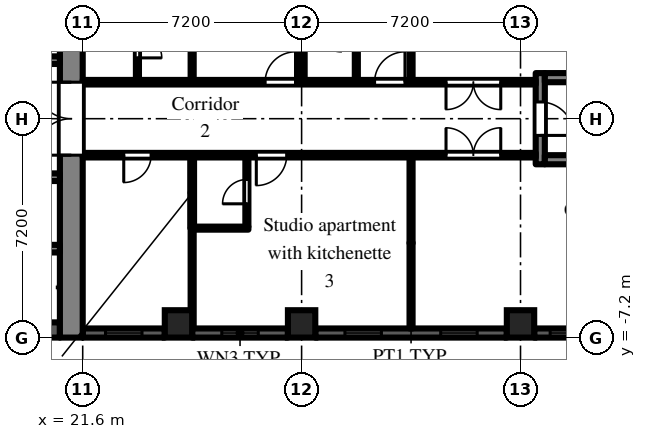
"""IFC4 building model, lengths in metres.
Left out: names, types, materials, properties, quantities, classifications, styles, units other than length and angle.
Written with IfcOpenShell. Run it as: python <this file> out.ifc"""

import sys

from ifc_helpers import new_model, si_unit, direction, frame, frame_2d, origin, origin_2d, place, context, subcontext, project, spatial, rectangle, extrude, element, fill, save


model = new_model("IFC4")
c1 = context("Model", 3, precision=1e-05, world=origin(), true_north=direction((0.0, 1.0)))
c2 = subcontext(c1, "Body", "Model", "MODEL_VIEW")
j1 = project(units=[si_unit("LENGTHUNIT", "METRE"), si_unit("PLANEANGLEUNIT", "RADIAN")], contexts=[c1])
p1 = place(None, origin())
s1 = spatial("IfcSite", under=j1, at=p1, CompositionType="ELEMENT")
p2 = place(p1, origin())
s2 = spatial("IfcBuilding", under=s1, at=p2, CompositionType="ELEMENT")
p3 = place(p2, frame((0.0, 0.0, 29.7)))
s3 = spatial("IfcBuildingStorey", under=s2, at=p3, CompositionType="ELEMENT", Elevation=29.7)
for number, where, z_axis, x_axis in (
    (1, (24.75, -6.75, 0.0), (0.0, 0.0, 1.0), (1.0, 0.0, 0.0)),
    (2, (28.8, -6.75, 0.0), (0.0, 0.0, 1.0), (1.0, 0.0, 0.0)),
    (3, (36.0, -6.75, 0.0), (0.0, 0.0, 1.0), (1.0, 0.0, 0.0)),
):
    element("IfcColumn", number, at=place(p3, frame(where, z_axis=z_axis, x_axis=x_axis)), inside=s3, PredefinedType="COLUMN", context=c2, shape_type="SweptSolid", body=[
        extrude(rectangle(XDim=0.9, YDim=0.9, at=origin_2d()), origin(), (0.0, 0.0, 1.0), 3.0),
    ])
p4 = place(p3, frame((21.6, -7.05, 0.0), z_axis=(0.0, 0.0, 1.0), x_axis=(1.0, 0.0, 0.0)))
e4 = element("IfcWall", 4, at=p4, inside=s3, PredefinedType="SOLIDWALL", context=c2, shape_type="SweptSolid", body=[
    extrude(rectangle(XDim=2.7, YDim=0.3, at=frame_2d((1.35, 0.0))), origin(), (0.0, 0.0, 1.0), 2.1),
])
p5 = place(p4, frame((0.75, 0.0, 0.2)))
e5 = element("IfcOpeningElement", 5, at=p5, cuts=e4, PredefinedType="OPENING", context=c2, shape_type="SweptSolid", body=[
    extrude(rectangle(XDim=1.2, YDim=1.85, at=frame_2d((0.6, 0.925))), frame((0.0, 0.16, 0.0), z_axis=(0.0, -1.0, 0.0), x_axis=(1.0, 0.0, 0.0)), (0.0, 0.0, 1.0), 0.32),
])
p6 = place(p3, frame((25.2, -7.05, 0.0), z_axis=(0.0, 0.0, 1.0), x_axis=(1.0, 0.0, 0.0)))
e6 = element("IfcWall", 6, at=p6, inside=s3, PredefinedType="SOLIDWALL", context=c2, shape_type="SweptSolid", body=[
    extrude(rectangle(XDim=3.15, YDim=0.3, at=frame_2d((1.575, 0.0))), origin(), (0.0, 0.0, 1.0), 2.1),
])
p7 = place(p6, frame((0.975, 0.0, 0.2)))
e7 = element("IfcOpeningElement", 7, at=p7, cuts=e6, PredefinedType="OPENING", context=c2, shape_type="SweptSolid", body=[
    extrude(rectangle(XDim=1.2, YDim=1.85, at=frame_2d((0.6, 0.925))), frame((0.0, 0.16, 0.0), z_axis=(0.0, -1.0, 0.0), x_axis=(1.0, 0.0, 0.0)), (0.0, 0.0, 1.0), 0.32),
])
p8 = place(p3, frame((29.25, -7.05, 0.0), z_axis=(0.0, 0.0, 1.0), x_axis=(1.0, 0.0, 0.0)))
e8 = element("IfcWall", 8, at=p8, inside=s3, PredefinedType="SOLIDWALL", context=c2, shape_type="SweptSolid", body=[
    extrude(rectangle(XDim=6.3, YDim=0.3, at=frame_2d((3.15, 0.0))), origin(), (0.0, 0.0, 1.0), 2.1),
])
p9 = place(p8, frame((0.975, 0.0, 0.2)))
e9 = element("IfcOpeningElement", 9, at=p9, cuts=e8, PredefinedType="OPENING", context=c2, shape_type="SweptSolid", body=[
    extrude(rectangle(XDim=1.2, YDim=1.85, at=frame_2d((0.6, 0.925))), frame((0.0, 0.16, 0.0), z_axis=(0.0, -1.0, 0.0), x_axis=(1.0, 0.0, 0.0)), (0.0, 0.0, 1.0), 0.32),
])
p10 = place(p8, frame((4.125, 0.0, 0.2)))
e10 = element("IfcOpeningElement", 10, at=p10, cuts=e8, PredefinedType="OPENING", context=c2, shape_type="SweptSolid", body=[
    extrude(rectangle(XDim=1.2, YDim=1.85, at=frame_2d((0.6, 0.925))), frame((0.0, 0.16, 0.0), z_axis=(0.0, -1.0, 0.0), x_axis=(1.0, 0.0, 0.0)), (0.0, 0.0, 1.0), 0.32),
])
p11 = place(p3, frame((36.45, -7.05, 0.0), z_axis=(0.0, 0.0, 1.0), x_axis=(1.0, 0.0, 0.0)))
e11 = element("IfcWall", 11, at=p11, inside=s3, PredefinedType="SOLIDWALL", context=c2, shape_type="SweptSolid", body=[
    extrude(rectangle(XDim=2.25, YDim=0.3, at=frame_2d((1.125, 0.0))), origin(), (0.0, 0.0, 1.0), 2.1),
])
p12 = place(p11, frame((0.525, 0.0, 0.2)))
e12 = element("IfcOpeningElement", 12, at=p12, cuts=e11, PredefinedType="OPENING", context=c2, shape_type="SweptSolid", body=[
    extrude(rectangle(XDim=1.2, YDim=1.85, at=frame_2d((0.6, 0.925))), frame((0.0, 0.16, 0.0), z_axis=(0.0, -1.0, 0.0), x_axis=(1.0, 0.0, 0.0)), (0.0, 0.0, 1.0), 0.32),
])
p13 = place(p3, frame((21.225, -7.2, 0.0), z_axis=(0.0, 0.0, 1.0), x_axis=(0.0, 1.0, 0.0)))
e13 = element("IfcWall", 13, at=p13, inside=s3, PredefinedType="SHEAR", context=c2, shape_type="SweptSolid", body=[
    extrude(rectangle(XDim=14.4, YDim=0.75, at=frame_2d((7.2, 0.0))), origin(), (0.0, 0.0, 1.0), 2.575),
])
p14 = place(p13, frame((6.0, 0.0, 0.0)))
e14 = element("IfcOpeningElement", 14, at=p14, cuts=e13, PredefinedType="OPENING", context=c2, shape_type="SweptSolid", body=[
    extrude(rectangle(XDim=2.4, YDim=2.2, at=frame_2d((1.2, 1.1))), frame((0.0, 0.385, 0.0), z_axis=(0.0, -1.0, 0.0), x_axis=(1.0, 0.0, 0.0)), (0.0, 0.0, 1.0), 0.77),
])
p15 = place(p3, frame((7.9, 1.925, 0.0), z_axis=(0.0, 0.0, 1.0), x_axis=(1.0, 0.0, 0.0)))
e15 = element("IfcWall", 15, at=p15, inside=s3, PredefinedType="SHEAR", context=c2, shape_type="SweptSolid", body=[
    extrude(rectangle(XDim=12.95, YDim=0.25, at=frame_2d((6.475, 0.0))), origin(), (0.0, 0.0, 1.0), 2.575),
])
p16 = place(p15, frame((0.525, 0.0, 0.0)))
e16 = element("IfcOpeningElement", 16, at=p16, cuts=e15, PredefinedType="OPENING", context=c2, shape_type="SweptSolid", body=[
    extrude(rectangle(XDim=0.9, YDim=2.1, at=frame_2d((0.45, 1.05))), frame((0.0, 0.135, 0.0), z_axis=(0.0, -1.0, 0.0), x_axis=(1.0, 0.0, 0.0)), (0.0, 0.0, 1.0), 0.27),
])
p17 = place(p15, frame((2.625, 0.0, 0.0)))
e17 = element("IfcOpeningElement", 17, at=p17, cuts=e15, PredefinedType="OPENING", context=c2, shape_type="SweptSolid", body=[
    extrude(rectangle(XDim=1.1, YDim=2.1, at=frame_2d((0.55, 1.05))), frame((0.0, 0.135, 0.0), z_axis=(0.0, -1.0, 0.0), x_axis=(1.0, 0.0, 0.0)), (0.0, 0.0, 1.0), 0.27),
])
p18 = place(p15, frame((6.025, 0.0, 0.0)))
e18 = element("IfcOpeningElement", 18, at=p18, cuts=e15, PredefinedType="OPENING", context=c2, shape_type="SweptSolid", body=[
    extrude(rectangle(XDim=0.9, YDim=2.1, at=frame_2d((0.45, 1.05))), frame((0.0, 0.135, 0.0), z_axis=(0.0, -1.0, 0.0), x_axis=(1.0, 0.0, 0.0)), (0.0, 0.0, 1.0), 0.27),
])
p19 = place(p15, frame((9.325, 0.0, 0.0)))
e19 = element("IfcOpeningElement", 19, at=p19, cuts=e15, PredefinedType="OPENING", context=c2, shape_type="SweptSolid", body=[
    extrude(rectangle(XDim=0.9, YDim=2.1, at=frame_2d((0.45, 1.05))), frame((0.0, 0.135, 0.0), z_axis=(0.0, -1.0, 0.0), x_axis=(1.0, 0.0, 0.0)), (0.0, 0.0, 1.0), 0.27),
])
p20 = place(p3, frame((7.9, -6.95, 0.0), z_axis=(0.0, 0.0, 1.0), x_axis=(1.0, 0.0, 0.0)))
e20 = element("IfcWall", 20, at=p20, inside=s3, PredefinedType="SHEAR", context=c2, shape_type="SweptSolid", body=[
    extrude(rectangle(XDim=12.95, YDim=0.5, at=frame_2d((6.475, 0.0))), origin(), (0.0, 0.0, 1.0), 2.575),
])
p21 = place(p3, frame((7.9, -1.925, 0.0), z_axis=(0.0, 0.0, 1.0), x_axis=(1.0, 0.0, 0.0)))
e21 = element("IfcWall", 21, at=p21, inside=s3, PredefinedType="SHEAR", context=c2, shape_type="SweptSolid", body=[
    extrude(rectangle(XDim=12.95, YDim=0.25, at=frame_2d((6.475, 0.0))), origin(), (0.0, 0.0, 1.0), 2.575),
])
p22 = place(p21, frame((4.825, 0.0, 0.0)))
e22 = element("IfcOpeningElement", 22, at=p22, cuts=e21, PredefinedType="OPENING", context=c2, shape_type="SweptSolid", body=[
    extrude(rectangle(XDim=1.1, YDim=2.1, at=frame_2d((0.55, 1.05))), frame((0.0, 0.135, 0.0), z_axis=(0.0, -1.0, 0.0), x_axis=(1.0, 0.0, 0.0)), (0.0, 0.0, 1.0), 0.27),
])
p23 = place(p21, frame((7.025, 0.0, 0.0)))
e23 = element("IfcOpeningElement", 23, at=p23, cuts=e21, PredefinedType="OPENING", context=c2, shape_type="SweptSolid", body=[
    extrude(rectangle(XDim=1.1, YDim=2.1, at=frame_2d((0.55, 1.05))), frame((0.0, 0.135, 0.0), z_axis=(0.0, -1.0, 0.0), x_axis=(1.0, 0.0, 0.0)), (0.0, 0.0, 1.0), 0.27),
])
p24 = place(p21, frame((9.225, 0.0, 0.0)))
e24 = element("IfcOpeningElement", 24, at=p24, cuts=e21, PredefinedType="OPENING", context=c2, shape_type="SweptSolid", body=[
    extrude(rectangle(XDim=1.1, YDim=2.1, at=frame_2d((0.55, 1.05))), frame((0.0, 0.135, 0.0), z_axis=(0.0, -1.0, 0.0), x_axis=(1.0, 0.0, 0.0)), (0.0, 0.0, 1.0), 0.27),
])
p25 = place(p21, frame((0.525, 0.0, 0.0)))
e25 = element("IfcOpeningElement", 25, at=p25, cuts=e21, PredefinedType="OPENING", context=c2, shape_type="SweptSolid", body=[
    extrude(rectangle(XDim=0.9, YDim=2.1, at=frame_2d((0.45, 1.05))), frame((0.0, 0.135, 0.0), z_axis=(0.0, -1.0, 0.0), x_axis=(1.0, 0.0, 0.0)), (0.0, 0.0, 1.0), 0.27),
])
p26 = place(p21, frame((2.625, 0.0, 0.0)))
e26 = element("IfcOpeningElement", 26, at=p26, cuts=e21, PredefinedType="OPENING", context=c2, shape_type="SweptSolid", body=[
    extrude(rectangle(XDim=1.1, YDim=2.1, at=frame_2d((0.55, 1.05))), frame((0.0, 0.135, 0.0), z_axis=(0.0, -1.0, 0.0), x_axis=(1.0, 0.0, 0.0)), (0.0, 0.0, 1.0), 0.27),
])
p27 = place(p3, frame((12.3, -4.275, 0.0), z_axis=(0.0, 0.0, 1.0), x_axis=(1.0, 0.0, 0.0)))
e27 = element("IfcWall", 27, at=p27, inside=s3, PredefinedType="SHEAR", context=c2, shape_type="SweptSolid", body=[
    extrude(rectangle(XDim=8.55, YDim=0.25, at=frame_2d((4.275, 0.0))), origin(), (0.0, 0.0, 1.0), 2.575),
])
p28 = place(p3, frame((36.65, -1.5, 0.0), z_axis=(0.0, 0.0, 1.0), x_axis=(0.0, 1.0, 0.0)))
e28 = element("IfcWall", 28, at=p28, inside=s3, PredefinedType="SHEAR", context=c2, shape_type="SweptSolid", body=[
    extrude(rectangle(XDim=3.0, YDim=0.3, at=frame_2d((1.5, 0.0))), origin(), (0.0, 0.0, 1.0), 2.575),
])
p29 = place(p28, frame((0.95, 0.0, 0.0)))
e29 = element("IfcOpeningElement", 29, at=p29, cuts=e28, PredefinedType="OPENING", context=c2, shape_type="SweptSolid", body=[
    extrude(rectangle(XDim=1.1, YDim=2.1, at=frame_2d((0.55, 1.05))), frame((0.0, 0.16, 0.0), z_axis=(0.0, -1.0, 0.0), x_axis=(1.0, 0.0, 0.0)), (0.0, 0.0, 1.0), 0.32),
])
for number, where, z_axis, x_axis in (
    (30, (36.8, -1.35, 0.0), (0.0, 0.0, 1.0), (1.0, 0.0, 0.0)),
    (31, (36.8, 1.35, 0.0), (0.0, 0.0, 1.0), (1.0, 0.0, 0.0)),
):
    element("IfcWall", number, at=place(p3, frame(where, z_axis=z_axis, x_axis=x_axis)), inside=s3, PredefinedType="SHEAR", context=c2, shape_type="SweptSolid", body=[
        extrude(rectangle(XDim=5.8, YDim=0.3, at=frame_2d((2.9, 0.0))), origin(), (0.0, 0.0, 1.0), 2.575),
    ])
p30 = place(p3, frame((21.6, -1.2, 0.0), z_axis=(0.0, 0.0, 1.0), x_axis=(1.0, 0.0, 0.0)))
e32 = element("IfcWall", 32, at=p30, inside=s3, PredefinedType="PARTITIONING", context=c2, shape_type="SweptSolid", body=[
    extrude(rectangle(XDim=14.9, YDim=0.15, at=frame_2d((7.45, 0.0))), origin(), (0.0, 0.0, 1.0), 2.575),
])
p31 = place(p30, frame((1.35, 0.0, 0.0)))
e33 = element("IfcOpeningElement", 33, at=p31, cuts=e32, PredefinedType="OPENING", context=c2, shape_type="SweptSolid", body=[
    extrude(rectangle(XDim=0.9, YDim=2.1, at=frame_2d((0.45, 1.05))), frame((0.0, 0.085, 0.0), z_axis=(0.0, -1.0, 0.0), x_axis=(1.0, 0.0, 0.0)), (0.0, 0.0, 1.0), 0.17),
])
p32 = place(p30, frame((5.71, 0.0, 0.0)))
e34 = element("IfcOpeningElement", 34, at=p32, cuts=e32, PredefinedType="OPENING", context=c2, shape_type="SweptSolid", body=[
    extrude(rectangle(XDim=1.0, YDim=2.1, at=frame_2d((0.5, 1.05))), frame((0.0, 0.085, 0.0), z_axis=(0.0, -1.0, 0.0), x_axis=(1.0, 0.0, 0.0)), (0.0, 0.0, 1.0), 0.17),
])
p33 = place(p30, frame((11.95, 0.0, 0.0)))
e35 = element("IfcOpeningElement", 35, at=p33, cuts=e32, PredefinedType="OPENING", context=c2, shape_type="SweptSolid", body=[
    extrude(rectangle(XDim=1.8, YDim=2.1, at=frame_2d((0.9, 1.05))), frame((0.0, 0.085, 0.0), z_axis=(0.0, -1.0, 0.0), x_axis=(1.0, 0.0, 0.0)), (0.0, 0.0, 1.0), 0.17),
])
p34 = place(p3, frame((21.6, 1.2, 0.0), z_axis=(0.0, 0.0, 1.0), x_axis=(1.0, 0.0, 0.0)))
e36 = element("IfcWall", 36, at=p34, inside=s3, PredefinedType="PARTITIONING", context=c2, shape_type="SweptSolid", body=[
    extrude(rectangle(XDim=14.9, YDim=0.15, at=frame_2d((7.45, 0.0))), origin(), (0.0, 0.0, 1.0), 2.575),
])
p35 = place(p34, frame((6.0, 0.0, 0.0)))
e37 = element("IfcOpeningElement", 37, at=p35, cuts=e36, PredefinedType="OPENING", context=c2, shape_type="SweptSolid", body=[
    extrude(rectangle(XDim=1.0, YDim=2.1, at=frame_2d((0.5, 1.05))), frame((0.0, 0.085, 0.0), z_axis=(0.0, -1.0, 0.0), x_axis=(1.0, 0.0, 0.0)), (0.0, 0.0, 1.0), 0.17),
])
p36 = place(p34, frame((9.6, 0.0, 0.0)))
e38 = element("IfcOpeningElement", 38, at=p36, cuts=e36, PredefinedType="OPENING", context=c2, shape_type="SweptSolid", body=[
    extrude(rectangle(XDim=1.0, YDim=2.1, at=frame_2d((0.5, 1.05))), frame((0.0, 0.085, 0.0), z_axis=(0.0, -1.0, 0.0), x_axis=(1.0, 0.0, 0.0)), (0.0, 0.0, 1.0), 0.17),
])
p37 = place(p34, frame((11.95, 0.0, 0.0)))
e39 = element("IfcOpeningElement", 39, at=p37, cuts=e36, PredefinedType="OPENING", context=c2, shape_type="SweptSolid", body=[
    extrude(rectangle(XDim=1.8, YDim=2.1, at=frame_2d((0.9, 1.05))), frame((0.0, 0.085, 0.0), z_axis=(0.0, -1.0, 0.0), x_axis=(1.0, 0.0, 0.0)), (0.0, 0.0, 1.0), 0.17),
])
p38 = place(p3, frame((23.4, 1.275, 0.0), z_axis=(0.0, 0.0, 1.0), x_axis=(0.0, 1.0, 0.0)))
e40 = element("IfcWall", 40, at=p38, inside=s3, PredefinedType="PARTITIONING", context=c2, shape_type="SweptSolid", body=[
    extrude(rectangle(XDim=2.375, YDim=0.1, at=frame_2d((1.188, 0.0))), origin(), (0.0, 0.0, 1.0), 2.575),
])
p39 = place(p38, frame((0.725, 0.0, 0.0)))
e41 = element("IfcOpeningElement", 41, at=p39, cuts=e40, PredefinedType="OPENING", context=c2, shape_type="SweptSolid", body=[
    extrude(rectangle(XDim=0.8, YDim=2.1, at=frame_2d((0.4, 1.05))), frame((0.0, 0.06, 0.0), z_axis=(0.0, -1.0, 0.0), x_axis=(1.0, 0.0, 0.0)), (0.0, 0.0, 1.0), 0.12),
])
p40 = place(p3, frame((25.2, -6.9, 0.0), z_axis=(0.0, 0.0, 1.0), x_axis=(0.0, 1.0, 0.0)))
e42 = element("IfcWall", 42, at=p40, inside=s3, PredefinedType="PARTITIONING", context=c2, shape_type="SweptSolid", body=[
    extrude(rectangle(XDim=3.3, YDim=0.1, at=frame_2d((1.65, 0.0))), origin(), (0.0, 0.0, 1.0), 2.575),
])
p41 = place(p3, frame((25.2, -3.6, 0.0), z_axis=(0.0, 0.0, 1.0), x_axis=(0.0, 1.0, 0.0)))
e43 = element("IfcWall", 43, at=p41, inside=s3, PredefinedType="PARTITIONING", context=c2, shape_type="SweptSolid", body=[
    extrude(rectangle(XDim=2.325, YDim=0.125, at=frame_2d((1.163, 0.0))), origin(), (0.0, 0.0, 1.0), 2.575),
])
p42 = place(p3, frame((25.262, -3.6, 0.0), z_axis=(0.0, 0.0, 1.0), x_axis=(1.0, 0.0, 0.0)))
e44 = element("IfcWall", 44, at=p42, inside=s3, PredefinedType="PARTITIONING", context=c2, shape_type="SweptSolid", body=[
    extrude(rectangle(XDim=1.788, YDim=0.1, at=frame_2d((0.894, 0.0))), origin(), (0.0, 0.0, 1.0), 2.575),
])
p43 = place(p3, frame((25.2, 1.275, 0.0), z_axis=(0.0, 0.0, 1.0), x_axis=(0.0, 1.0, 0.0)))
e45 = element("IfcWall", 45, at=p43, inside=s3, PredefinedType="PARTITIONING", context=c2, shape_type="SweptSolid", body=[
    extrude(rectangle(XDim=2.275, YDim=0.1, at=frame_2d((1.138, 0.0))), origin(), (0.0, 0.0, 1.0), 2.575),
])
p44 = place(p3, frame((27.0, -3.55, 0.0), z_axis=(0.0, 0.0, 1.0), x_axis=(0.0, 1.0, 0.0)))
e46 = element("IfcWall", 46, at=p44, inside=s3, PredefinedType="PARTITIONING", context=c2, shape_type="SweptSolid", body=[
    extrude(rectangle(XDim=2.275, YDim=0.1, at=frame_2d((1.138, 0.0))), origin(), (0.0, 0.0, 1.0), 2.575),
])
p45 = place(p44, frame((0.75, 0.0, 0.0)))
e47 = element("IfcOpeningElement", 47, at=p45, cuts=e46, PredefinedType="OPENING", context=c2, shape_type="SweptSolid", body=[
    extrude(rectangle(XDim=0.8, YDim=2.1, at=frame_2d((0.4, 1.05))), frame((0.0, 0.06, 0.0), z_axis=(0.0, -1.0, 0.0), x_axis=(1.0, 0.0, 0.0)), (0.0, 0.0, 1.0), 0.12),
])
p46 = place(p3, frame((28.8, 1.275, 0.0), z_axis=(0.0, 0.0, 1.0), x_axis=(0.0, 1.0, 0.0)))
e48 = element("IfcWall", 48, at=p46, inside=s3, PredefinedType="PARTITIONING", context=c2, shape_type="SweptSolid", body=[
    extrude(rectangle(XDim=5.625, YDim=0.2, at=frame_2d((2.812, 0.0))), origin(), (0.0, 0.0, 1.0), 2.575),
])
p47 = place(p3, frame((30.6, 1.275, 0.0), z_axis=(0.0, 0.0, 1.0), x_axis=(0.0, 1.0, 0.0)))
e49 = element("IfcWall", 49, at=p47, inside=s3, PredefinedType="PARTITIONING", context=c2, shape_type="SweptSolid", body=[
    extrude(rectangle(XDim=1.675, YDim=0.1, at=frame_2d((0.837, 0.0))), origin(), (0.0, 0.0, 1.0), 2.575),
])
for number, where, z_axis, x_axis in (
    (50, (32.4, -6.9, 0.0), (0.0, 0.0, 1.0), (0.0, 1.0, 0.0)),
    (51, (32.4, 1.275, 0.0), (0.0, 0.0, 1.0), (0.0, 1.0, 0.0)),
):
    element("IfcWall", number, at=place(p3, frame(where, z_axis=z_axis, x_axis=x_axis)), inside=s3, PredefinedType="PARTITIONING", context=c2, shape_type="SweptSolid", body=[
        extrude(rectangle(XDim=5.625, YDim=0.1, at=frame_2d((2.812, 0.0))), origin(), (0.0, 0.0, 1.0), 2.575),
    ])
p48 = place(p5, origin())
e52 = element("IfcWindow", 52, at=p48, inside=s3, PartitioningType="SINGLE_PANEL", PredefinedType="WINDOW", context=c2, shape_type="SweptSolid", body=[
    extrude(rectangle(XDim=1.2, YDim=1.85, at=frame_2d((0.6, 0.925))), frame((0.0, 0.03, 0.0), z_axis=(0.0, -1.0, 0.0), x_axis=(1.0, 0.0, 0.0)), (0.0, 0.0, 1.0), 0.06),
])
fill(e5, e52)
p49 = place(p7, origin())
e53 = element("IfcWindow", 53, at=p49, inside=s3, PartitioningType="SINGLE_PANEL", PredefinedType="WINDOW", context=c2, shape_type="SweptSolid", body=[
    extrude(rectangle(XDim=1.2, YDim=1.85, at=frame_2d((0.6, 0.925))), frame((0.0, 0.03, 0.0), z_axis=(0.0, -1.0, 0.0), x_axis=(1.0, 0.0, 0.0)), (0.0, 0.0, 1.0), 0.06),
])
fill(e7, e53)
p50 = place(p9, origin())
e54 = element("IfcWindow", 54, at=p50, inside=s3, PartitioningType="SINGLE_PANEL", PredefinedType="WINDOW", context=c2, shape_type="SweptSolid", body=[
    extrude(rectangle(XDim=1.2, YDim=1.85, at=frame_2d((0.6, 0.925))), frame((0.0, 0.03, 0.0), z_axis=(0.0, -1.0, 0.0), x_axis=(1.0, 0.0, 0.0)), (0.0, 0.0, 1.0), 0.06),
])
fill(e9, e54)
p51 = place(p10, origin())
e55 = element("IfcWindow", 55, at=p51, inside=s3, PartitioningType="SINGLE_PANEL", PredefinedType="WINDOW", context=c2, shape_type="SweptSolid", body=[
    extrude(rectangle(XDim=1.2, YDim=1.85, at=frame_2d((0.6, 0.925))), frame((0.0, 0.03, 0.0), z_axis=(0.0, -1.0, 0.0), x_axis=(1.0, 0.0, 0.0)), (0.0, 0.0, 1.0), 0.06),
])
fill(e10, e55)
p52 = place(p12, origin())
e56 = element("IfcWindow", 56, at=p52, inside=s3, PartitioningType="SINGLE_PANEL", PredefinedType="WINDOW", context=c2, shape_type="SweptSolid", body=[
    extrude(rectangle(XDim=1.2, YDim=1.85, at=frame_2d((0.6, 0.925))), frame((0.0, 0.03, 0.0), z_axis=(0.0, -1.0, 0.0), x_axis=(1.0, 0.0, 0.0)), (0.0, 0.0, 1.0), 0.06),
])
fill(e12, e56)
p53 = place(p14, origin())
e57 = element("IfcDoor", 57, at=p53, inside=s3, OperationType="DOUBLE_DOOR_DOUBLE_SWING", PredefinedType="DOOR", context=c2, shape_type="SweptSolid", body=[
    extrude(rectangle(XDim=2.4, YDim=2.2, at=frame_2d((1.2, 1.1))), frame((0.0, 0.025, 0.0), z_axis=(0.0, -1.0, 0.0), x_axis=(1.0, 0.0, 0.0)), (0.0, 0.0, 1.0), 0.05),
])
fill(e14, e57)
p54 = place(p29, frame((1.1, 0.0, 0.0), z_axis=(0.0, 0.0, 1.0), x_axis=(-1.0, 0.0, 0.0)))
e58 = element("IfcDoor", 58, at=p54, inside=s3, OperationType="SINGLE_SWING_RIGHT", PredefinedType="DOOR", context=c2, shape_type="SweptSolid", body=[
    extrude(rectangle(XDim=1.1, YDim=2.1, at=frame_2d((0.55, 1.05))), frame((0.0, 0.025, 0.0), z_axis=(0.0, -1.0, 0.0), x_axis=(1.0, 0.0, 0.0)), (0.0, 0.0, 1.0), 0.05),
])
fill(e29, e58)
p55 = place(p39, frame((0.8, 0.0, 0.0), z_axis=(0.0, 0.0, 1.0), x_axis=(-1.0, 0.0, 0.0)))
e59 = element("IfcDoor", 59, at=p55, inside=s3, OperationType="SINGLE_SWING_RIGHT", PredefinedType="DOOR", context=c2, shape_type="SweptSolid", body=[
    extrude(rectangle(XDim=0.8, YDim=2.1, at=frame_2d((0.4, 1.05))), frame((0.0, 0.025, 0.0), z_axis=(0.0, -1.0, 0.0), x_axis=(1.0, 0.0, 0.0)), (0.0, 0.0, 1.0), 0.05),
])
fill(e41, e59)
p56 = place(p35, origin())
e60 = element("IfcDoor", 60, at=p56, inside=s3, OperationType="SINGLE_SWING_RIGHT", PredefinedType="DOOR", context=c2, shape_type="SweptSolid", body=[
    extrude(rectangle(XDim=1.0, YDim=2.1, at=frame_2d((0.5, 1.05))), frame((0.0, 0.025, 0.0), z_axis=(0.0, -1.0, 0.0), x_axis=(1.0, 0.0, 0.0)), (0.0, 0.0, 1.0), 0.05),
])
fill(e37, e60)
p57 = place(p36, origin())
e61 = element("IfcDoor", 61, at=p57, inside=s3, OperationType="SINGLE_SWING_RIGHT", PredefinedType="DOOR", context=c2, shape_type="SweptSolid", body=[
    extrude(rectangle(XDim=1.0, YDim=2.1, at=frame_2d((0.5, 1.05))), frame((0.0, 0.025, 0.0), z_axis=(0.0, -1.0, 0.0), x_axis=(1.0, 0.0, 0.0)), (0.0, 0.0, 1.0), 0.05),
])
fill(e38, e61)
p58 = place(p37, frame((1.8, 0.0, 0.0), z_axis=(0.0, 0.0, 1.0), x_axis=(-1.0, 0.0, 0.0)))
e62 = element("IfcDoor", 62, at=p58, inside=s3, OperationType="DOUBLE_DOOR_DOUBLE_SWING", PredefinedType="DOOR", context=c2, shape_type="SweptSolid", body=[
    extrude(rectangle(XDim=1.8, YDim=2.1, at=frame_2d((0.9, 1.05))), frame((0.0, 0.025, 0.0), z_axis=(0.0, -1.0, 0.0), x_axis=(1.0, 0.0, 0.0)), (0.0, 0.0, 1.0), 0.05),
])
fill(e39, e62)
p59 = place(p31, frame((0.9, 0.0, 0.0), z_axis=(0.0, 0.0, 1.0), x_axis=(-1.0, 0.0, 0.0)))
e63 = element("IfcDoor", 63, at=p59, inside=s3, OperationType="SINGLE_SWING_RIGHT", PredefinedType="DOOR", context=c2, shape_type="SweptSolid", body=[
    extrude(rectangle(XDim=0.9, YDim=2.1, at=frame_2d((0.45, 1.05))), frame((0.0, 0.025, 0.0), z_axis=(0.0, -1.0, 0.0), x_axis=(1.0, 0.0, 0.0)), (0.0, 0.0, 1.0), 0.05),
])
fill(e33, e63)
p60 = place(p45, origin())
e64 = element("IfcDoor", 64, at=p60, inside=s3, OperationType="SINGLE_SWING_LEFT", PredefinedType="DOOR", context=c2, shape_type="SweptSolid", body=[
    extrude(rectangle(XDim=0.8, YDim=2.1, at=frame_2d((0.4, 1.05))), frame((0.0, 0.025, 0.0), z_axis=(0.0, -1.0, 0.0), x_axis=(1.0, 0.0, 0.0)), (0.0, 0.0, 1.0), 0.05),
])
fill(e47, e64)
p61 = place(p32, frame((1.0, 0.0, 0.0), z_axis=(0.0, 0.0, 1.0), x_axis=(-1.0, 0.0, 0.0)))
e65 = element("IfcDoor", 65, at=p61, inside=s3, OperationType="SINGLE_SWING_RIGHT", PredefinedType="DOOR", context=c2, shape_type="SweptSolid", body=[
    extrude(rectangle(XDim=1.0, YDim=2.1, at=frame_2d((0.5, 1.05))), frame((0.0, 0.025, 0.0), z_axis=(0.0, -1.0, 0.0), x_axis=(1.0, 0.0, 0.0)), (0.0, 0.0, 1.0), 0.05),
])
fill(e34, e65)
p62 = place(p33, origin())
e66 = element("IfcDoor", 66, at=p62, inside=s3, OperationType="DOUBLE_DOOR_DOUBLE_SWING", PredefinedType="DOOR", context=c2, shape_type="SweptSolid", body=[
    extrude(rectangle(XDim=1.8, YDim=2.1, at=frame_2d((0.9, 1.05))), frame((0.0, 0.025, 0.0), z_axis=(0.0, -1.0, 0.0), x_axis=(1.0, 0.0, 0.0)), (0.0, 0.0, 1.0), 0.05),
])
fill(e35, e66)
save(model, sys.argv[1])
